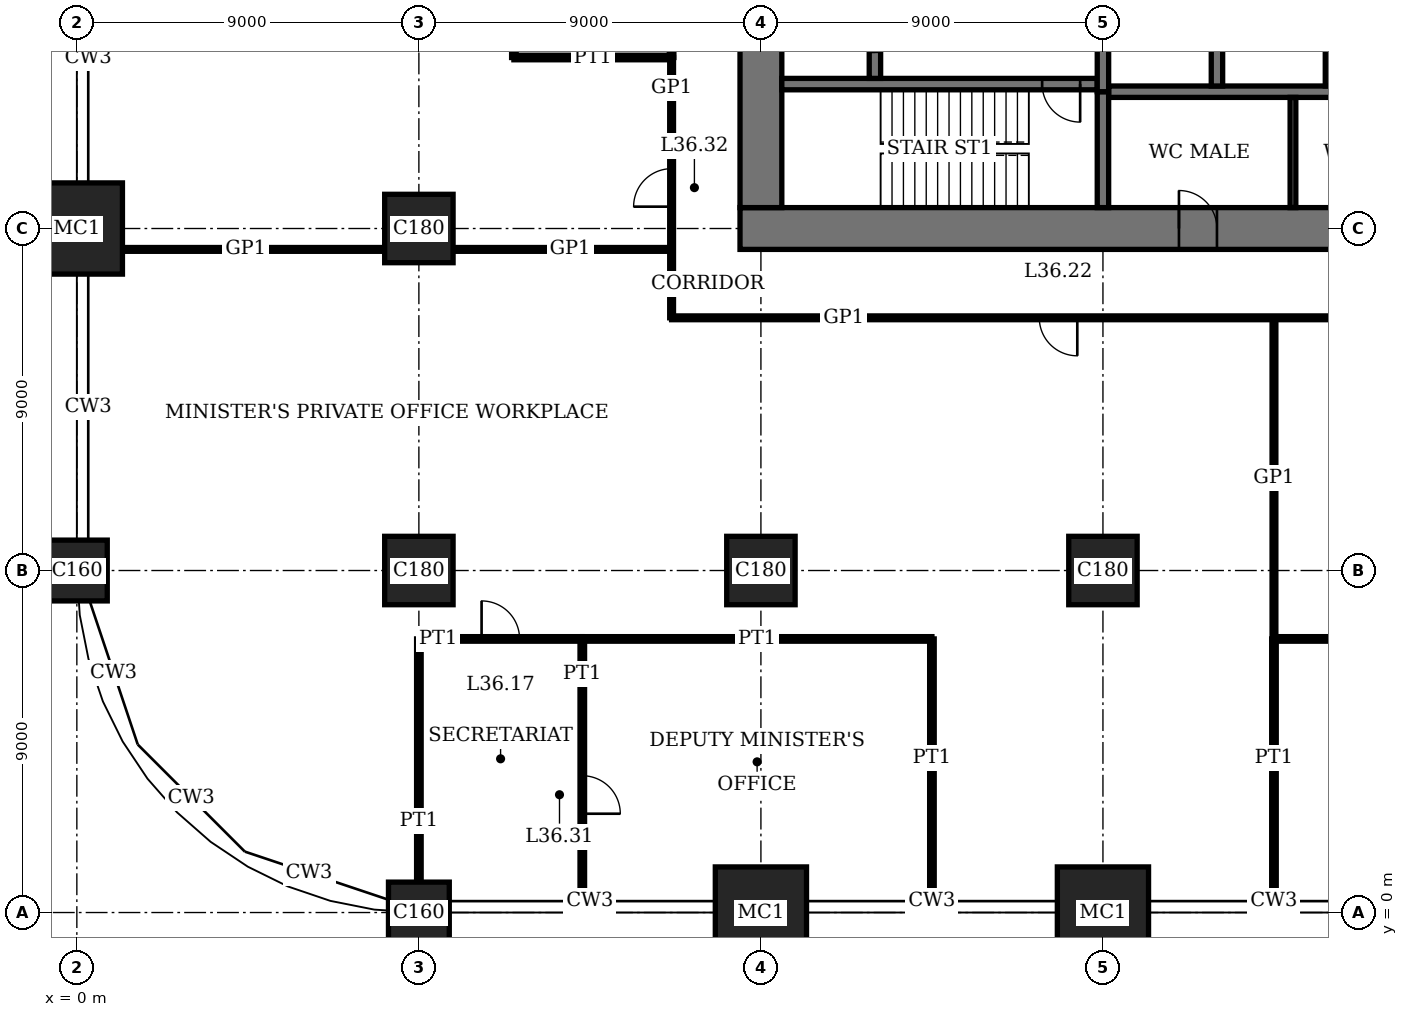
"""IFC4 building model, lengths in metres.
Left out: names, types, materials, properties, quantities, classifications, styles, units other than length and angle.
Written with IfcOpenShell. Run it as: python <this file> out.ifc"""

import sys

from ifc_helpers import new_model, si_unit, direction, frame, frame_2d, origin, origin_2d, place, context, subcontext, project, spatial, rectangle, extrude, element, fill, save


model = new_model("IFC4")
c1 = context("Model", 3, precision=1e-05, world=origin(), true_north=direction((0.0, 1.0)))
c2 = subcontext(c1, "Body", "Model", "MODEL_VIEW")
j1 = project(units=[si_unit("LENGTHUNIT", "METRE"), si_unit("PLANEANGLEUNIT", "RADIAN")], contexts=[c1])
p1 = place(None, origin())
s1 = spatial("IfcSite", under=j1, at=p1, CompositionType="ELEMENT")
p2 = place(p1, origin())
s2 = spatial("IfcBuilding", under=s1, at=p2, CompositionType="ELEMENT")
p3 = place(p2, frame((0.0, 0.0, 149.0)))
s3 = spatial("IfcBuildingStorey", under=s2, at=p3, CompositionType="ELEMENT", Elevation=149.0)
p4 = place(p3, frame((0.0, 9.0, 0.0), z_axis=(0.0, 0.0, 1.0), x_axis=(1.0, 0.0, 0.0)))
e1 = element("IfcColumn", 1, at=p4, inside=s3, PredefinedType="COLUMN", context=c2, shape_type="SweptSolid", body=[
    extrude(rectangle(XDim=1.6, YDim=1.6, at=origin_2d()), origin(), (0.0, 0.0, 1.0), 4.0),
])
p5 = place(p3, frame((0.0, 18.0, 0.0), z_axis=(0.0, 0.0, 1.0), x_axis=(1.0, 0.0, 0.0)))
e2 = element("IfcColumn", 2, at=p5, inside=s3, PredefinedType="COLUMN", context=c2, shape_type="SweptSolid", body=[
    extrude(rectangle(XDim=2.4, YDim=2.4, at=origin_2d()), origin(), (0.0, 0.0, 1.0), 4.0),
])
p6 = place(p3, frame((9.0, 0.0, 0.0), z_axis=(0.0, 0.0, 1.0), x_axis=(1.0, 0.0, 0.0)))
e3 = element("IfcColumn", 3, at=p6, inside=s3, PredefinedType="COLUMN", context=c2, shape_type="SweptSolid", body=[
    extrude(rectangle(XDim=1.6, YDim=1.6, at=origin_2d()), origin(), (0.0, 0.0, 1.0), 4.0),
])
for number, where, z_axis, x_axis in (
    (4, (9.0, 9.0, 0.0), (0.0, 0.0, 1.0), (1.0, 0.0, 0.0)),
    (5, (9.0, 18.0, 0.0), (0.0, 0.0, 1.0), (1.0, 0.0, 0.0)),
):
    element("IfcColumn", number, at=place(p3, frame(where, z_axis=z_axis, x_axis=x_axis)), inside=s3, PredefinedType="COLUMN", context=c2, shape_type="SweptSolid", body=[
        extrude(rectangle(XDim=1.8, YDim=1.8, at=origin_2d()), origin(), (0.0, 0.0, 1.0), 4.0),
    ])
p7 = place(p3, frame((18.0, 0.0, 0.0), z_axis=(0.0, 0.0, 1.0), x_axis=(1.0, 0.0, 0.0)))
e6 = element("IfcColumn", 6, at=p7, inside=s3, PredefinedType="COLUMN", context=c2, shape_type="SweptSolid", body=[
    extrude(rectangle(XDim=2.4, YDim=2.4, at=origin_2d()), origin(), (0.0, 0.0, 1.0), 4.0),
])
p8 = place(p3, frame((18.0, 9.0, 0.0), z_axis=(0.0, 0.0, 1.0), x_axis=(1.0, 0.0, 0.0)))
e7 = element("IfcColumn", 7, at=p8, inside=s3, PredefinedType="COLUMN", context=c2, shape_type="SweptSolid", body=[
    extrude(rectangle(XDim=1.8, YDim=1.8, at=origin_2d()), origin(), (0.0, 0.0, 1.0), 4.0),
])
p9 = place(p3, frame((27.0, 0.0, 0.0), z_axis=(0.0, 0.0, 1.0), x_axis=(1.0, 0.0, 0.0)))
e8 = element("IfcColumn", 8, at=p9, inside=s3, PredefinedType="COLUMN", context=c2, shape_type="SweptSolid", body=[
    extrude(rectangle(XDim=2.4, YDim=2.4, at=origin_2d()), origin(), (0.0, 0.0, 1.0), 4.0),
])
p10 = place(p3, frame((27.0, 9.0, 0.0), z_axis=(0.0, 0.0, 1.0), x_axis=(1.0, 0.0, 0.0)))
e9 = element("IfcColumn", 9, at=p10, inside=s3, PredefinedType="COLUMN", context=c2, shape_type="SweptSolid", body=[
    extrude(rectangle(XDim=1.8, YDim=1.8, at=origin_2d()), origin(), (0.0, 0.0, 1.0), 4.0),
])
p11 = place(p3, frame((17.45, 18.0, 0.0), z_axis=(0.0, 0.0, 1.0), x_axis=(1.0, 0.0, 0.0)))
e10 = element("IfcWall", 10, at=p11, inside=s3, PredefinedType="SHEAR", context=c2, shape_type="SweptSolid", body=[
    extrude(rectangle(XDim=28.1, YDim=1.1, at=frame_2d((14.05, 0.0))), origin(), (0.0, 0.0, 1.0), 4.0),
])
p12 = place(p11, frame((11.55, 0.0, 0.0)))
e11 = element("IfcOpeningElement", 11, at=p12, cuts=e10, PredefinedType="OPENING", context=c2, shape_type="SweptSolid", body=[
    extrude(rectangle(XDim=1.0, YDim=2.4, at=frame_2d((0.5, 1.2))), frame((0.0, 0.56, 0.0), z_axis=(0.0, -1.0, 0.0), x_axis=(1.0, 0.0, 0.0)), (0.0, 0.0, 1.0), 1.12),
])
p13 = place(p11, frame((16.55, 0.0, 0.0)))
e12 = element("IfcOpeningElement", 12, at=p13, cuts=e10, PredefinedType="OPENING", context=c2, shape_type="SweptSolid", body=[
    extrude(rectangle(XDim=1.0, YDim=2.4, at=frame_2d((0.5, 1.2))), frame((0.0, 0.56, 0.0), z_axis=(0.0, -1.0, 0.0), x_axis=(1.0, 0.0, 0.0)), (0.0, 0.0, 1.0), 1.12),
])
p14 = place(p11, frame((20.0, 0.0, 0.0)))
e13 = element("IfcOpeningElement", 13, at=p14, cuts=e10, PredefinedType="OPENING", context=c2, shape_type="SweptSolid", body=[
    extrude(rectangle(XDim=1.1, YDim=2.4, at=frame_2d((0.55, 1.2))), frame((0.0, 0.56, 0.0), z_axis=(0.0, -1.0, 0.0), x_axis=(1.0, 0.0, 0.0)), (0.0, 0.0, 1.0), 1.12),
])
p15 = place(p11, frame((24.05, 0.0, 0.0)))
e14 = element("IfcOpeningElement", 14, at=p15, cuts=e10, PredefinedType="OPENING", context=c2, shape_type="SweptSolid", body=[
    extrude(rectangle(XDim=1.0, YDim=2.4, at=frame_2d((0.5, 1.2))), frame((0.0, 0.56, 0.0), z_axis=(0.0, -1.0, 0.0), x_axis=(1.0, 0.0, 0.0)), (0.0, 0.0, 1.0), 1.12),
])
p16 = place(p3, frame((18.0, 35.45, 0.0), z_axis=(0.0, 0.0, 1.0), x_axis=(0.0, -1.0, 0.0)))
e15 = element("IfcWall", 15, at=p16, inside=s3, PredefinedType="SHEAR", context=c2, shape_type="SweptSolid", body=[
    extrude(rectangle(XDim=16.9, YDim=1.1, at=frame_2d((8.45, 0.0))), origin(), (0.0, 0.0, 1.0), 4.0),
])
p17 = place(p16, frame((8.45, 0.0, 0.0)))
e16 = element("IfcOpeningElement", 16, at=p17, cuts=e15, PredefinedType="OPENING", context=c2, shape_type="SweptSolid", body=[
    extrude(rectangle(XDim=1.8, YDim=2.4, at=frame_2d((0.9, 1.2))), frame((0.0, 0.56, 0.0), z_axis=(0.0, -1.0, 0.0), x_axis=(1.0, 0.0, 0.0)), (0.0, 0.0, 1.0), 1.12),
])
p18 = place(p3, frame((18.55, 21.8, 0.0), z_axis=(0.0, 0.0, 1.0), x_axis=(1.0, 0.0, 0.0)))
e17 = element("IfcWall", 17, at=p18, inside=s3, PredefinedType="SHEAR", context=c2, shape_type="SweptSolid", body=[
    extrude(rectangle(XDim=8.3, YDim=0.3, at=frame_2d((4.15, 0.0))), origin(), (0.0, 0.0, 1.0), 4.0),
])
p19 = place(p18, frame((6.85, 0.0, 0.0)))
e18 = element("IfcOpeningElement", 18, at=p19, cuts=e17, PredefinedType="OPENING", context=c2, shape_type="SweptSolid", body=[
    extrude(rectangle(XDim=1.0, YDim=2.4, at=frame_2d((0.5, 1.2))), frame((0.0, 0.16, 0.0), z_axis=(0.0, -1.0, 0.0), x_axis=(1.0, 0.0, 0.0)), (0.0, 0.0, 1.0), 0.32),
])
p20 = place(p3, frame((27.0, 18.55, 0.0), z_axis=(0.0, 0.0, 1.0), x_axis=(0.0, 1.0, 0.0)))
e19 = element("IfcWall", 19, at=p20, inside=s3, PredefinedType="SHEAR", context=c2, shape_type="SweptSolid", body=[
    extrude(rectangle(XDim=3.05, YDim=0.3, at=frame_2d((1.525, 0.0))), origin(), (0.0, 0.0, 1.0), 4.0),
])
p21 = place(p3, frame((21.0, 21.95, 0.0), z_axis=(0.0, 0.0, 1.0), x_axis=(0.0, 1.0, 0.0)))
e20 = element("IfcWall", 20, at=p21, inside=s3, PredefinedType="SHEAR", context=c2, shape_type="SweptSolid", body=[
    extrude(rectangle(XDim=2.5, YDim=0.3, at=frame_2d((1.25, 0.0))), origin(), (0.0, 0.0, 1.0), 4.0),
])
p22 = place(p21, frame((0.7, 0.0, 0.0)))
e21 = element("IfcOpeningElement", 21, at=p22, cuts=e20, PredefinedType="OPENING", context=c2, shape_type="SweptSolid", body=[
    extrude(rectangle(XDim=1.1, YDim=2.4, at=frame_2d((0.55, 1.2))), frame((0.0, 0.16, 0.0), z_axis=(0.0, -1.0, 0.0), x_axis=(1.0, 0.0, 0.0)), (0.0, 0.0, 1.0), 0.32),
])
p23 = place(p3, frame((27.15, 21.6, 0.0), z_axis=(0.0, 0.0, 1.0), x_axis=(1.0, 0.0, 0.0)))
e22 = element("IfcWall", 22, at=p23, inside=s3, PredefinedType="SHEAR", context=c2, shape_type="SweptSolid", body=[
    extrude(rectangle(XDim=17.3, YDim=0.3, at=frame_2d((8.65, 0.0))), origin(), (0.0, 0.0, 1.0), 4.0),
])
for number, where, z_axis, x_axis in (
    (23, (30.0, 21.75, 0.0), (0.0, 0.0, 1.0), (0.0, 1.0, 0.0)),
    (24, (33.0, 21.75, 0.0), (0.0, 0.0, 1.0), (0.0, 1.0, 0.0)),
):
    element("IfcWall", number, at=place(p3, frame(where, z_axis=z_axis, x_axis=x_axis)), inside=s3, PredefinedType="SHEAR", context=c2, shape_type="SweptSolid", body=[
        extrude(rectangle(XDim=2.7, YDim=0.3, at=frame_2d((1.35, 0.0))), origin(), (0.0, 0.0, 1.0), 4.0),
    ])
p24 = place(p3, frame((27.0, 21.6, 0.0), z_axis=(0.0, 0.0, 1.0), x_axis=(0.0, 1.0, 0.0)))
e25 = element("IfcWall", 25, at=p24, inside=s3, PredefinedType="SHEAR", context=c2, shape_type="SweptSolid", body=[
    extrude(rectangle(XDim=2.85, YDim=0.3, at=frame_2d((1.425, 0.0))), origin(), (0.0, 0.0, 1.0), 4.0),
])
p25 = place(p3, frame((9.0, 7.2, 0.0), z_axis=(0.0, 0.0, 1.0), x_axis=(1.0, 0.0, 0.0)))
e26 = element("IfcWall", 26, at=p25, inside=s3, PredefinedType="PARTITIONING", context=c2, shape_type="SweptSolid", body=[
    extrude(rectangle(XDim=4.3, YDim=0.12, at=frame_2d((2.15, 0.0))), origin(), (0.0, 0.0, 1.0), 3.75),
])
p26 = place(p25, frame((1.65, 0.0, 0.0)))
e27 = element("IfcOpeningElement", 27, at=p26, cuts=e26, PredefinedType="OPENING", context=c2, shape_type="SweptSolid", body=[
    extrude(rectangle(XDim=1.0, YDim=2.4, at=frame_2d((0.5, 1.2))), frame((0.0, 0.07, 0.0), z_axis=(0.0, -1.0, 0.0), x_axis=(1.0, 0.0, 0.0)), (0.0, 0.0, 1.0), 0.14),
])
p27 = place(p3, frame((13.3, 7.2, 0.0), z_axis=(0.0, 0.0, 1.0), x_axis=(1.0, 0.0, 0.0)))
e28 = element("IfcWall", 28, at=p27, inside=s3, PredefinedType="PARTITIONING", context=c2, shape_type="SweptSolid", body=[
    extrude(rectangle(XDim=9.2, YDim=0.12, at=frame_2d((4.6, 0.0))), origin(), (0.0, 0.0, 1.0), 3.75),
])
p28 = place(p3, frame((31.5, 7.2, 0.0), z_axis=(0.0, 0.0, 1.0), x_axis=(1.0, 0.0, 0.0)))
e29 = element("IfcWall", 29, at=p28, inside=s3, PredefinedType="PARTITIONING", context=c2, shape_type="SweptSolid", body=[
    extrude(rectangle(XDim=9.0, YDim=0.12, at=frame_2d((4.5, 0.0))), origin(), (0.0, 0.0, 1.0), 3.75),
])
p29 = place(p28, frame((5.65, 0.0, 0.0)))
e30 = element("IfcOpeningElement", 30, at=p29, cuts=e29, PredefinedType="OPENING", context=c2, shape_type="SweptSolid", body=[
    extrude(rectangle(XDim=1.0, YDim=2.4, at=frame_2d((0.5, 1.2))), frame((0.0, 0.07, 0.0), z_axis=(0.0, -1.0, 0.0), x_axis=(1.0, 0.0, 0.0)), (0.0, 0.0, 1.0), 0.14),
])
p30 = place(p3, frame((15.65, 15.65, 0.0), z_axis=(0.0, 0.0, 1.0), x_axis=(1.0, 0.0, 0.0)))
e31 = element("IfcWall", 31, at=p30, inside=s3, PredefinedType="PARTITIONING", context=c2, shape_type="SweptSolid", body=[
    extrude(rectangle(XDim=20.35, YDim=0.1, at=frame_2d((10.175, 0.0))), origin(), (0.0, 0.0, 1.0), 3.75),
])
p31 = place(p30, frame((9.675, 0.0, 0.0)))
e32 = element("IfcOpeningElement", 32, at=p31, cuts=e31, PredefinedType="OPENING", context=c2, shape_type="SweptSolid", body=[
    extrude(rectangle(XDim=1.0, YDim=2.4, at=frame_2d((0.5, 1.2))), frame((0.0, 0.06, 0.0), z_axis=(0.0, -1.0, 0.0), x_axis=(1.0, 0.0, 0.0)), (0.0, 0.0, 1.0), 0.12),
])
p32 = place(p3, frame((1.2, 17.45, 0.0), z_axis=(0.0, 0.0, 1.0), x_axis=(1.0, 0.0, 0.0)))
e33 = element("IfcWall", 33, at=p32, inside=s3, PredefinedType="PARTITIONING", context=c2, shape_type="SweptSolid", body=[
    extrude(rectangle(XDim=6.9, YDim=0.1, at=frame_2d((3.45, 0.0))), origin(), (0.0, 0.0, 1.0), 3.05),
])
p33 = place(p3, frame((9.9, 17.45, 0.0), z_axis=(0.0, 0.0, 1.0), x_axis=(1.0, 0.0, 0.0)))
e34 = element("IfcWall", 34, at=p33, inside=s3, PredefinedType="PARTITIONING", context=c2, shape_type="SweptSolid", body=[
    extrude(rectangle(XDim=5.75, YDim=0.1, at=frame_2d((2.875, 0.0))), origin(), (0.0, 0.0, 1.0), 3.05),
])
p34 = place(p3, frame((11.5, 22.5, 0.0), z_axis=(0.0, 0.0, 1.0), x_axis=(1.0, 0.0, 0.0)))
e35 = element("IfcWall", 35, at=p34, inside=s3, PredefinedType="PARTITIONING", context=c2, shape_type="SweptSolid", body=[
    extrude(rectangle(XDim=4.15, YDim=0.12, at=frame_2d((2.075, 0.0))), origin(), (0.0, 0.0, 1.0), 3.1),
])
p35 = place(p3, frame((9.0, 0.8, 0.0), z_axis=(0.0, 0.0, 1.0), x_axis=(0.0, 1.0, 0.0)))
e36 = element("IfcWall", 36, at=p35, inside=s3, PredefinedType="PARTITIONING", context=c2, shape_type="SweptSolid", body=[
    extrude(rectangle(XDim=6.4, YDim=0.12, at=frame_2d((3.2, 0.0))), origin(), (0.0, 0.0, 1.0), 3.05),
])
p36 = place(p3, frame((11.5, 22.5, 0.0), z_axis=(0.0, 0.0, 1.0), x_axis=(0.0, 1.0, 0.0)))
e37 = element("IfcWall", 37, at=p36, inside=s3, PredefinedType="PARTITIONING", context=c2, shape_type="SweptSolid", body=[
    extrude(rectangle(XDim=4.5, YDim=0.12, at=frame_2d((2.25, 0.0))), origin(), (0.0, 0.0, 1.0), 3.75),
])
p37 = place(p36, frame((1.75, 0.0, 0.0)))
e38 = element("IfcOpeningElement", 38, at=p37, cuts=e37, PredefinedType="OPENING", context=c2, shape_type="SweptSolid", body=[
    extrude(rectangle(XDim=1.0, YDim=2.4, at=frame_2d((0.5, 1.2))), frame((0.0, 0.07, 0.0), z_axis=(0.0, -1.0, 0.0), x_axis=(1.0, 0.0, 0.0)), (0.0, 0.0, 1.0), 0.14),
])
p38 = place(p3, frame((13.3, 0.31, 0.0), z_axis=(0.0, 0.0, 1.0), x_axis=(0.0, 1.0, 0.0)))
e39 = element("IfcWall", 39, at=p38, inside=s3, PredefinedType="PARTITIONING", context=c2, shape_type="SweptSolid", body=[
    extrude(rectangle(XDim=6.89, YDim=0.12, at=frame_2d((3.445, 0.0))), origin(), (0.0, 0.0, 1.0), 3.75),
])
p39 = place(p38, frame((2.29, 0.0, 0.0)))
e40 = element("IfcOpeningElement", 40, at=p39, cuts=e39, PredefinedType="OPENING", context=c2, shape_type="SweptSolid", body=[
    extrude(rectangle(XDim=1.0, YDim=2.4, at=frame_2d((0.5, 1.2))), frame((0.0, 0.07, 0.0), z_axis=(0.0, -1.0, 0.0), x_axis=(1.0, 0.0, 0.0)), (0.0, 0.0, 1.0), 0.14),
])
p40 = place(p3, frame((15.65, 22.5, 0.0), z_axis=(0.0, 0.0, 1.0), x_axis=(0.0, 1.0, 0.0)))
e41 = element("IfcWall", 41, at=p40, inside=s3, PredefinedType="PARTITIONING", context=c2, shape_type="SweptSolid", body=[
    extrude(rectangle(XDim=4.5, YDim=0.12, at=frame_2d((2.25, 0.0))), origin(), (0.0, 0.0, 1.0), 3.75),
])
p41 = place(p3, frame((15.65, 15.65, 0.0), z_axis=(0.0, 0.0, 1.0), x_axis=(0.0, 1.0, 0.0)))
e42 = element("IfcWall", 42, at=p41, inside=s3, PredefinedType="PARTITIONING", context=c2, shape_type="SweptSolid", body=[
    extrude(rectangle(XDim=6.85, YDim=0.1, at=frame_2d((3.425, 0.0))), origin(), (0.0, 0.0, 1.0), 3.75),
])
p42 = place(p41, frame((2.925, 0.0, 0.0)))
e43 = element("IfcOpeningElement", 43, at=p42, cuts=e42, PredefinedType="OPENING", context=c2, shape_type="SweptSolid", body=[
    extrude(rectangle(XDim=1.0, YDim=2.4, at=frame_2d((0.5, 1.2))), frame((0.0, 0.06, 0.0), z_axis=(0.0, -1.0, 0.0), x_axis=(1.0, 0.0, 0.0)), (0.0, 0.0, 1.0), 0.12),
])
for number, where, z_axis, x_axis in (
    (44, (22.5, 0.31, 0.0), (0.0, 0.0, 1.0), (0.0, 1.0, 0.0)),
    (45, (31.5, 0.31, 0.0), (0.0, 0.0, 1.0), (0.0, 1.0, 0.0)),
):
    element("IfcWall", number, at=place(p3, frame(where, z_axis=z_axis, x_axis=x_axis)), inside=s3, PredefinedType="PARTITIONING", context=c2, shape_type="SweptSolid", body=[
        extrude(rectangle(XDim=6.89, YDim=0.12, at=frame_2d((3.445, 0.0))), origin(), (0.0, 0.0, 1.0), 3.75),
    ])
p43 = place(p3, frame((31.5, 7.2, 0.0), z_axis=(0.0, 0.0, 1.0), x_axis=(0.0, 1.0, 0.0)))
e46 = element("IfcWall", 46, at=p43, inside=s3, PredefinedType="PARTITIONING", context=c2, shape_type="SweptSolid", body=[
    extrude(rectangle(XDim=8.45, YDim=0.1, at=frame_2d((4.225, 0.0))), origin(), (0.0, 0.0, 1.0), 3.75),
])
p44 = place(p3, frame((32.0, 18.55, 0.0), z_axis=(0.0, 0.0, 1.0), x_axis=(0.0, 1.0, 0.0)))
e47 = element("IfcWall", 47, at=p44, inside=s3, PredefinedType="PARTITIONING", context=c2, shape_type="SweptSolid", body=[
    extrude(rectangle(XDim=2.9, YDim=0.15, at=frame_2d((1.45, 0.0))), origin(), (0.0, 0.0, 1.0), 3.75),
])
p45 = place(p12, origin())
e48 = element("IfcDoor", 48, at=p45, inside=s3, OperationType="SINGLE_SWING_RIGHT", PredefinedType="DOOR", context=c2, shape_type="SweptSolid", body=[
    extrude(rectangle(XDim=1.0, YDim=2.4, at=frame_2d((0.5, 1.2))), frame((0.0, 0.025, 0.0), z_axis=(0.0, -1.0, 0.0), x_axis=(1.0, 0.0, 0.0)), (0.0, 0.0, 1.0), 0.05),
    extrude(rectangle(XDim=0.04, YDim=2.4, at=frame_2d((0.02, 1.2))), frame((0.0, 0.4, 0.0), z_axis=(0.0, -1.0, 0.0), x_axis=(1.0, 0.0, 0.0)), (0.0, 0.0, 1.0), 0.8),
    extrude(rectangle(XDim=0.04, YDim=2.4, at=frame_2d((0.98, 1.2))), frame((0.0, 0.4, 0.0), z_axis=(0.0, -1.0, 0.0), x_axis=(1.0, 0.0, 0.0)), (0.0, 0.0, 1.0), 0.8),
    extrude(rectangle(XDim=1.0, YDim=0.04, at=frame_2d((0.5, 2.38))), frame((0.0, 0.4, 0.0), z_axis=(0.0, -1.0, 0.0), x_axis=(1.0, 0.0, 0.0)), (0.0, 0.0, 1.0), 0.8),
])
fill(e11, e48)
p46 = place(p19, origin())
e49 = element("IfcDoor", 49, at=p46, inside=s3, OperationType="SINGLE_SWING_RIGHT", PredefinedType="DOOR", context=c2, shape_type="SweptSolid", body=[
    extrude(rectangle(XDim=1.0, YDim=2.4, at=frame_2d((0.5, 1.2))), frame((0.0, 0.03, 0.0), z_axis=(0.0, -1.0, 0.0), x_axis=(1.0, 0.0, 0.0)), (0.0, 0.0, 1.0), 0.06),
])
fill(e18, e49)
p47 = place(p26, origin())
e50 = element("IfcDoor", 50, at=p47, inside=s3, OperationType="SINGLE_SWING_RIGHT", PredefinedType="DOOR", context=c2, shape_type="SweptSolid", body=[
    extrude(rectangle(XDim=1.0, YDim=2.4, at=frame_2d((0.5, 1.2))), frame((0.0, 0.025, 0.0), z_axis=(0.0, -1.0, 0.0), x_axis=(1.0, 0.0, 0.0)), (0.0, 0.0, 1.0), 0.05),
])
fill(e27, e50)
p48 = place(p31, origin())
e51 = element("IfcDoor", 51, at=p48, inside=s3, OperationType="SINGLE_SWING_RIGHT", PredefinedType="DOOR", context=c2, shape_type="SweptSolid", body=[
    extrude(rectangle(XDim=1.0, YDim=2.4, at=frame_2d((0.5, 1.2))), frame((0.0, 0.02, 0.0), z_axis=(0.0, -1.0, 0.0), x_axis=(1.0, 0.0, 0.0)), (0.0, 0.0, 1.0), 0.04),
])
fill(e32, e51)
p49 = place(p39, origin())
e52 = element("IfcDoor", 52, at=p49, inside=s3, OperationType="SINGLE_SWING_LEFT", PredefinedType="DOOR", context=c2, shape_type="SweptSolid", body=[
    extrude(rectangle(XDim=1.0, YDim=2.4, at=frame_2d((0.5, 1.2))), frame((0.0, 0.025, 0.0), z_axis=(0.0, -1.0, 0.0), x_axis=(1.0, 0.0, 0.0)), (0.0, 0.0, 1.0), 0.05),
])
fill(e40, e52)
p50 = place(p42, origin())
e53 = element("IfcDoor", 53, at=p50, inside=s3, OperationType="SINGLE_SWING_RIGHT", PredefinedType="DOOR", context=c2, shape_type="SweptSolid", body=[
    extrude(rectangle(XDim=1.0, YDim=2.4, at=frame_2d((0.5, 1.2))), frame((0.0, 0.02, 0.0), z_axis=(0.0, -1.0, 0.0), x_axis=(1.0, 0.0, 0.0)), (0.0, 0.0, 1.0), 0.04),
])
fill(e43, e53)
save(model, sys.argv[1])
